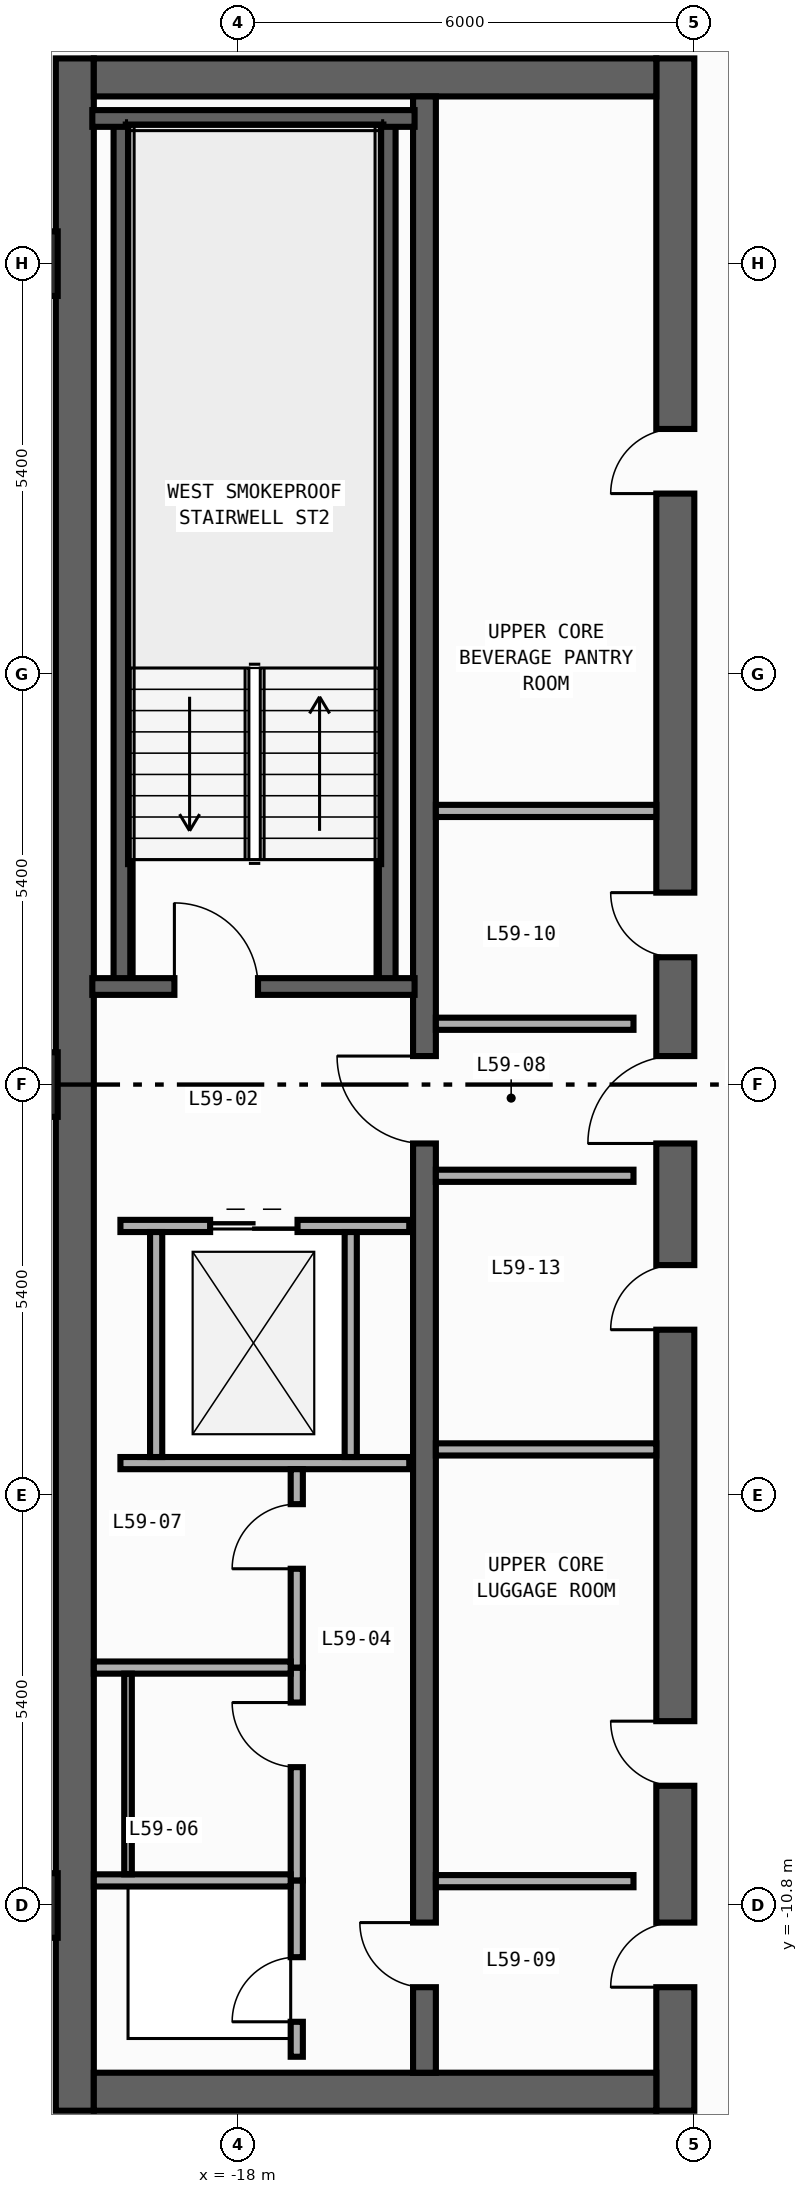
"""IFC4 building model, lengths in metres.
Left out: names, types, materials, properties, quantities, classifications, styles, units other than length and angle.
Written with IfcOpenShell. Run it as: python <this file> out.ifc"""

import sys

from ifc_helpers import new_model, si_unit, direction, frame, frame_2d, origin, origin_2d, place, context, subcontext, project, spatial, rectangle, extrude, element, fill, save


model = new_model("IFC4")
c1 = context("Model", 3, precision=1e-05, world=origin(), true_north=direction((0.0, 1.0)))
c2 = subcontext(c1, "Body", "Model", "MODEL_VIEW")
j1 = project(units=[si_unit("LENGTHUNIT", "METRE"), si_unit("PLANEANGLEUNIT", "RADIAN")], contexts=[c1])
p1 = place(None, origin())
s1 = spatial("IfcSite", under=j1, at=p1, CompositionType="ELEMENT")
p2 = place(p1, origin())
s2 = spatial("IfcBuilding", under=s1, at=p2, CompositionType="ELEMENT")
p3 = place(p2, frame((0.0, 0.0, 251.2)))
s3 = spatial("IfcBuildingStorey", under=s2, at=p3, CompositionType="ELEMENT", Elevation=251.2)
p4 = place(p3, frame((-20.15, -13.5, 0.0), z_axis=(0.0, 0.0, 1.0), x_axis=(0.0, 1.0, 0.0)))
e1 = element("IfcWall", 1, at=p4, inside=s3, PredefinedType="SHEAR", context=c2, shape_type="SweptSolid", body=[
    extrude(rectangle(XDim=27.0, YDim=0.5, at=frame_2d((13.5, 0.0))), origin(), (0.0, 0.0, 1.0), 3.34),
])
p5 = place(p3, frame((-12.25, -13.5, 0.0), z_axis=(0.0, 0.0, 1.0), x_axis=(0.0, 1.0, 0.0)))
e2 = element("IfcWall", 2, at=p5, inside=s3, PredefinedType="SHEAR", context=c2, shape_type="SweptSolid", body=[
    extrude(rectangle(XDim=27.0, YDim=0.5, at=frame_2d((13.5, 0.0))), origin(), (0.0, 0.0, 1.0), 3.34),
])
p6 = place(p5, frame((15.175, 0.0, 0.0)))
e3 = element("IfcOpeningElement", 3, at=p6, cuts=e2, PredefinedType="OPENING", context=c2, shape_type="SweptSolid", body=[
    extrude(rectangle(XDim=0.85, YDim=2.1, at=frame_2d((0.425, 1.05))), frame((0.0, 0.26, 0.0), z_axis=(0.0, -1.0, 0.0), x_axis=(1.0, 0.0, 0.0)), (0.0, 0.0, 1.0), 0.52),
])
p7 = place(p5, frame((21.275, 0.0, 0.0)))
e4 = element("IfcOpeningElement", 4, at=p7, cuts=e2, PredefinedType="OPENING", context=c2, shape_type="SweptSolid", body=[
    extrude(rectangle(XDim=0.85, YDim=2.1, at=frame_2d((0.425, 1.05))), frame((0.0, 0.26, 0.0), z_axis=(0.0, -1.0, 0.0), x_axis=(1.0, 0.0, 0.0)), (0.0, 0.0, 1.0), 0.52),
])
p8 = place(p5, frame((4.275, 0.0, 0.0)))
e5 = element("IfcOpeningElement", 5, at=p8, cuts=e2, PredefinedType="OPENING", context=c2, shape_type="SweptSolid", body=[
    extrude(rectangle(XDim=0.85, YDim=2.1, at=frame_2d((0.425, 1.05))), frame((0.0, 0.26, 0.0), z_axis=(0.0, -1.0, 0.0), x_axis=(1.0, 0.0, 0.0)), (0.0, 0.0, 1.0), 0.52),
])
p9 = place(p5, frame((10.275, 0.0, 0.0)))
e6 = element("IfcOpeningElement", 6, at=p9, cuts=e2, PredefinedType="OPENING", context=c2, shape_type="SweptSolid", body=[
    extrude(rectangle(XDim=0.85, YDim=2.1, at=frame_2d((0.425, 1.05))), frame((0.0, 0.26, 0.0), z_axis=(0.0, -1.0, 0.0), x_axis=(1.0, 0.0, 0.0)), (0.0, 0.0, 1.0), 0.52),
])
p10 = place(p5, frame((12.725, 0.0, 0.0)))
e7 = element("IfcOpeningElement", 7, at=p10, cuts=e2, PredefinedType="OPENING", context=c2, shape_type="SweptSolid", body=[
    extrude(rectangle(XDim=1.15, YDim=2.2, at=frame_2d((0.575, 1.1))), frame((0.0, 0.26, 0.0), z_axis=(0.0, -1.0, 0.0), x_axis=(1.0, 0.0, 0.0)), (0.0, 0.0, 1.0), 0.52),
])
p11 = place(p5, frame((1.625, 0.0, 0.0)))
e8 = element("IfcOpeningElement", 8, at=p11, cuts=e2, PredefinedType="OPENING", context=c2, shape_type="SweptSolid", body=[
    extrude(rectangle(XDim=0.85, YDim=2.1, at=frame_2d((0.425, 1.05))), frame((0.0, 0.26, 0.0), z_axis=(0.0, -1.0, 0.0), x_axis=(1.0, 0.0, 0.0)), (0.0, 0.0, 1.0), 0.52),
])
for number, where, z_axis, x_axis in (
    (9, (-19.9, -13.25, 0.0), (0.0, 0.0, 1.0), (1.0, 0.0, 0.0)),
    (10, (-19.9, 13.25, 0.0), (0.0, 0.0, 1.0), (1.0, 0.0, 0.0)),
):
    element("IfcWall", number, at=place(p3, frame(where, z_axis=z_axis, x_axis=x_axis)), inside=s3, PredefinedType="SHEAR", context=c2, shape_type="SweptSolid", body=[
        extrude(rectangle(XDim=7.4, YDim=0.5, at=frame_2d((3.7, 0.0))), origin(), (0.0, 0.0, 1.0), 3.34),
    ])
p12 = place(p3, frame((-15.55, -13.0, 0.0), z_axis=(0.0, 0.0, 1.0), x_axis=(0.0, 1.0, 0.0)))
e11 = element("IfcWall", 11, at=p12, inside=s3, PredefinedType="SHEAR", context=c2, shape_type="SweptSolid", body=[
    extrude(rectangle(XDim=26.0, YDim=0.3, at=frame_2d((13.0, 0.0))), origin(), (0.0, 0.0, 1.0), 3.34),
])
p13 = place(p12, frame((12.225, 0.0, 0.0)))
e12 = element("IfcOpeningElement", 12, at=p13, cuts=e11, PredefinedType="OPENING", context=c2, shape_type="SweptSolid", body=[
    extrude(rectangle(XDim=1.15, YDim=2.2, at=frame_2d((0.575, 1.1))), frame((0.0, 0.16, 0.0), z_axis=(0.0, -1.0, 0.0), x_axis=(1.0, 0.0, 0.0)), (0.0, 0.0, 1.0), 0.32),
])
p14 = place(p12, frame((1.125, 0.0, 0.0)))
e13 = element("IfcOpeningElement", 13, at=p14, cuts=e11, PredefinedType="OPENING", context=c2, shape_type="SweptSolid", body=[
    extrude(rectangle(XDim=0.85, YDim=2.1, at=frame_2d((0.425, 1.05))), frame((0.0, 0.16, 0.0), z_axis=(0.0, -1.0, 0.0), x_axis=(1.0, 0.0, 0.0)), (0.0, 0.0, 1.0), 0.32),
])
for number, where, z_axis, x_axis in (
    (14, (-16.04, 1.29, 0.0), (0.0, 0.0, 1.0), (0.0, 1.0, 0.0)),
    (15, (-19.53, 1.29, 0.0), (0.0, 0.0, 1.0), (0.0, 1.0, 0.0)),
):
    element("IfcWall", number, at=place(p3, frame(where, z_axis=z_axis, x_axis=x_axis)), inside=s3, PredefinedType="SHEAR", context=c2, shape_type="SweptSolid", body=[
        extrude(rectangle(XDim=11.42, YDim=0.22, at=frame_2d((5.71, 0.0))), origin(), (0.0, 0.0, 1.0), 3.34),
    ])
p15 = place(p3, frame((-19.92, 12.71, 0.0), z_axis=(0.0, 0.0, 1.0), x_axis=(1.0, 0.0, 0.0)))
e16 = element("IfcWall", 16, at=p15, inside=s3, PredefinedType="SHEAR", context=c2, shape_type="SweptSolid", body=[
    extrude(rectangle(XDim=4.24, YDim=0.22, at=frame_2d((2.12, 0.0))), origin(), (0.0, 0.0, 1.0), 3.34),
])
p16 = place(p3, frame((-19.92, 1.29, 0.0), z_axis=(0.0, 0.0, 1.0), x_axis=(1.0, 0.0, 0.0)))
e17 = element("IfcWall", 17, at=p16, inside=s3, PredefinedType="SHEAR", context=c2, shape_type="SweptSolid", body=[
    extrude(rectangle(XDim=4.24, YDim=0.22, at=frame_2d((2.12, 0.0))), origin(), (0.0, 0.0, 1.0), 3.34),
])
p17 = place(p16, frame((1.08, 0.0, 0.0)))
e18 = element("IfcOpeningElement", 18, at=p17, cuts=e17, PredefinedType="OPENING", context=c2, shape_type="SweptSolid", body=[
    extrude(rectangle(XDim=1.1, YDim=2.2, at=frame_2d((0.55, 1.1))), frame((0.0, 0.12, 0.0), z_axis=(0.0, -1.0, 0.0), x_axis=(1.0, 0.0, 0.0)), (0.0, 0.0, 1.0), 0.24),
])
for number, where, z_axis, x_axis in (
    (19, (-20.8, -10.8, 0.0), (0.0, 0.0, 1.0), (1.0, 0.0, 0.0)),
    (20, (-20.8, 0.0, 0.0), (0.0, 0.0, 1.0), (1.0, 0.0, 0.0)),
    (21, (-20.8, 10.8, 0.0), (0.0, 0.0, 1.0), (1.0, 0.0, 0.0)),
):
    element("IfcColumn", number, at=place(p3, frame(where, z_axis=z_axis, x_axis=x_axis)), inside=s3, PredefinedType="COLUMN", context=c2, shape_type="SweptSolid", body=[
        extrude(rectangle(XDim=0.85, YDim=0.85, at=origin_2d()), origin(), (0.0, 0.0, 1.0), 3.6),
    ])
p18 = place(p3, frame((-19.55, -1.86, 0.0), z_axis=(0.0, 0.0, 1.0), x_axis=(1.0, 0.0, 0.0)))
e22 = element("IfcWall", 22, at=p18, inside=s3, PredefinedType="STANDARD", context=c2, shape_type="SweptSolid", body=[
    extrude(rectangle(XDim=3.8, YDim=0.16, at=frame_2d((1.9, 0.0))), origin(), (0.0, 0.0, 1.0), 3.34),
])
p19 = place(p18, frame((1.18, 0.0, 0.0)))
e23 = element("IfcOpeningElement", 23, at=p19, cuts=e22, PredefinedType="OPENING", context=c2, shape_type="SweptSolid", body=[
    extrude(rectangle(XDim=1.15, YDim=2.2, at=frame_2d((0.575, 1.1))), frame((0.0, 0.09, 0.0), z_axis=(0.0, -1.0, 0.0), x_axis=(1.0, 0.0, 0.0)), (0.0, 0.0, 1.0), 0.18),
])
p20 = place(p3, frame((-19.55, -4.98, 0.0), z_axis=(0.0, 0.0, 1.0), x_axis=(1.0, 0.0, 0.0)))
e24 = element("IfcWall", 24, at=p20, inside=s3, PredefinedType="STANDARD", context=c2, shape_type="SweptSolid", body=[
    extrude(rectangle(XDim=3.8, YDim=0.16, at=frame_2d((1.9, 0.0))), origin(), (0.0, 0.0, 1.0), 3.34),
])
for number, where, z_axis, x_axis in (
    (25, (-19.08, -4.9, 0.0), (0.0, 0.0, 1.0), (0.0, 1.0, 0.0)),
    (26, (-16.52, -4.9, 0.0), (0.0, 0.0, 1.0), (0.0, 1.0, 0.0)),
):
    element("IfcWall", number, at=place(p3, frame(where, z_axis=z_axis, x_axis=x_axis)), inside=s3, PredefinedType="STANDARD", context=c2, shape_type="SweptSolid", body=[
        extrude(rectangle(XDim=2.96, YDim=0.16, at=frame_2d((1.48, 0.0))), origin(), (0.0, 0.0, 1.0), 3.34),
    ])
for number, where, z_axis, x_axis in (
    (27, (-15.4, 0.8, 0.0), (0.0, 0.0, 1.0), (1.0, 0.0, 0.0)),
    (28, (-15.4, -1.2, 0.0), (0.0, 0.0, 1.0), (1.0, 0.0, 0.0)),
    (29, (-15.4, -10.48, 0.0), (0.0, 0.0, 1.0), (1.0, 0.0, 0.0)),
):
    element("IfcWall", number, at=place(p3, frame(where, z_axis=z_axis, x_axis=x_axis)), inside=s3, PredefinedType="STANDARD", context=c2, shape_type="SweptSolid", body=[
        extrude(rectangle(XDim=2.6, YDim=0.16, at=frame_2d((1.3, 0.0))), origin(), (0.0, 0.0, 1.0), 3.34),
    ])
p21 = place(p3, frame((-17.23, -12.79, 0.0), z_axis=(0.0, 0.0, 1.0), x_axis=(0.0, 1.0, 0.0)))
e30 = element("IfcWall", 30, at=p21, inside=s3, PredefinedType="PARTITIONING", context=c2, shape_type="SweptSolid", body=[
    extrude(rectangle(XDim=2.32, YDim=0.16, at=frame_2d((1.16, 0.0))), origin(), (0.0, 0.0, 1.0), 3.34),
])
p22 = place(p21, frame((0.46, 0.0, 0.0)))
e31 = element("IfcOpeningElement", 31, at=p22, cuts=e30, PredefinedType="OPENING", context=c2, shape_type="SweptSolid", body=[
    extrude(rectangle(XDim=0.85, YDim=2.1, at=frame_2d((0.425, 1.05))), frame((0.0, 0.09, 0.0), z_axis=(0.0, -1.0, 0.0), x_axis=(1.0, 0.0, 0.0)), (0.0, 0.0, 1.0), 0.18),
])
p23 = place(p3, frame((-17.23, -10.47, 0.0), z_axis=(0.0, 0.0, 1.0), x_axis=(0.0, 1.0, 0.0)))
e32 = element("IfcWall", 32, at=p23, inside=s3, PredefinedType="PARTITIONING", context=c2, shape_type="SweptSolid", body=[
    extrude(rectangle(XDim=2.8, YDim=0.16, at=frame_2d((1.4, 0.0))), origin(), (0.0, 0.0, 1.0), 3.34),
])
p24 = place(p23, frame((1.49, 0.0, 0.0)))
e33 = element("IfcOpeningElement", 33, at=p24, cuts=e32, PredefinedType="OPENING", context=c2, shape_type="SweptSolid", body=[
    extrude(rectangle(XDim=0.85, YDim=2.1, at=frame_2d((0.425, 1.05))), frame((0.0, 0.09, 0.0), z_axis=(0.0, -1.0, 0.0), x_axis=(1.0, 0.0, 0.0)), (0.0, 0.0, 1.0), 0.18),
])
p25 = place(p3, frame((-17.23, -7.67, 0.0), z_axis=(0.0, 0.0, 1.0), x_axis=(0.0, 1.0, 0.0)))
e34 = element("IfcWall", 34, at=p25, inside=s3, PredefinedType="PARTITIONING", context=c2, shape_type="SweptSolid", body=[
    extrude(rectangle(XDim=2.61, YDim=0.16, at=frame_2d((1.305, 0.0))), origin(), (0.0, 0.0, 1.0), 3.34),
])
p26 = place(p25, frame((1.3, 0.0, 0.0)))
e35 = element("IfcOpeningElement", 35, at=p26, cuts=e34, PredefinedType="OPENING", context=c2, shape_type="SweptSolid", body=[
    extrude(rectangle(XDim=0.85, YDim=2.1, at=frame_2d((0.425, 1.05))), frame((0.0, 0.09, 0.0), z_axis=(0.0, -1.0, 0.0), x_axis=(1.0, 0.0, 0.0)), (0.0, 0.0, 1.0), 0.18),
])
for number, where, z_axis, x_axis in (
    (36, (-19.9, -10.47, 0.0), (0.0, 0.0, 1.0), (1.0, 0.0, 0.0)),
    (37, (-19.9, -7.67, 0.0), (0.0, 0.0, 1.0), (1.0, 0.0, 0.0)),
):
    element("IfcWall", number, at=place(p3, frame(where, z_axis=z_axis, x_axis=x_axis)), inside=s3, PredefinedType="PARTITIONING", context=c2, shape_type="SweptSolid", body=[
        extrude(rectangle(XDim=2.59, YDim=0.16, at=frame_2d((1.295, 0.0))), origin(), (0.0, 0.0, 1.0), 3.34),
    ])
for number, where, z_axis, x_axis in (
    (38, (-15.4, 3.6, 0.0), (0.0, 0.0, 1.0), (1.0, 0.0, 0.0)),
    (39, (-15.4, -4.8, 0.0), (0.0, 0.0, 1.0), (1.0, 0.0, 0.0)),
):
    element("IfcWall", number, at=place(p3, frame(where, z_axis=z_axis, x_axis=x_axis)), inside=s3, PredefinedType="PARTITIONING", context=c2, shape_type="SweptSolid", body=[
        extrude(rectangle(XDim=2.9, YDim=0.16, at=frame_2d((1.45, 0.0))), origin(), (0.0, 0.0, 1.0), 3.34),
    ])
p27 = place(p3, frame((-19.45, -10.39, 0.0), z_axis=(0.0, 0.0, 1.0), x_axis=(0.0, 1.0, 0.0)))
e40 = element("IfcWall", 40, at=p27, inside=s3, PredefinedType="PARTITIONING", context=c2, shape_type="SweptSolid", body=[
    extrude(rectangle(XDim=2.64, YDim=0.1, at=frame_2d((1.32, 0.0))), origin(), (0.0, 0.0, 1.0), 3.34),
])
p28 = place(p17, origin())
e41 = element("IfcDoor", 41, at=p28, inside=s3, OperationType="SINGLE_SWING_LEFT", PredefinedType="DOOR", context=c2, shape_type="SweptSolid", body=[
    extrude(rectangle(XDim=1.1, YDim=2.2, at=frame_2d((0.55, 1.1))), frame((0.0, 0.025, 0.0), z_axis=(0.0, -1.0, 0.0), x_axis=(1.0, 0.0, 0.0)), (0.0, 0.0, 1.0), 0.05),
])
fill(e18, e41)
p29 = place(p6, origin())
e42 = element("IfcDoor", 42, at=p29, inside=s3, OperationType="SINGLE_SWING_RIGHT", PredefinedType="DOOR", context=c2, shape_type="SweptSolid", body=[
    extrude(rectangle(XDim=0.85, YDim=2.1, at=frame_2d((0.425, 1.05))), frame((0.0, 0.025, 0.0), z_axis=(0.0, -1.0, 0.0), x_axis=(1.0, 0.0, 0.0)), (0.0, 0.0, 1.0), 0.05),
])
fill(e3, e42)
p30 = place(p7, origin())
e43 = element("IfcDoor", 43, at=p30, inside=s3, OperationType="SINGLE_SWING_LEFT", PredefinedType="DOOR", context=c2, shape_type="SweptSolid", body=[
    extrude(rectangle(XDim=0.85, YDim=2.1, at=frame_2d((0.425, 1.05))), frame((0.0, 0.025, 0.0), z_axis=(0.0, -1.0, 0.0), x_axis=(1.0, 0.0, 0.0)), (0.0, 0.0, 1.0), 0.05),
])
fill(e4, e43)
p31 = place(p8, origin())
e44 = element("IfcDoor", 44, at=p31, inside=s3, OperationType="SINGLE_SWING_RIGHT", PredefinedType="DOOR", context=c2, shape_type="SweptSolid", body=[
    extrude(rectangle(XDim=0.85, YDim=2.1, at=frame_2d((0.425, 1.05))), frame((0.0, 0.025, 0.0), z_axis=(0.0, -1.0, 0.0), x_axis=(1.0, 0.0, 0.0)), (0.0, 0.0, 1.0), 0.05),
])
fill(e5, e44)
p32 = place(p9, origin())
e45 = element("IfcDoor", 45, at=p32, inside=s3, OperationType="SINGLE_SWING_LEFT", PredefinedType="DOOR", context=c2, shape_type="SweptSolid", body=[
    extrude(rectangle(XDim=0.85, YDim=2.1, at=frame_2d((0.425, 1.05))), frame((0.0, 0.025, 0.0), z_axis=(0.0, -1.0, 0.0), x_axis=(1.0, 0.0, 0.0)), (0.0, 0.0, 1.0), 0.05),
])
fill(e6, e45)
p33 = place(p10, origin())
e46 = element("IfcDoor", 46, at=p33, inside=s3, OperationType="SINGLE_SWING_LEFT", PredefinedType="DOOR", context=c2, shape_type="SweptSolid", body=[
    extrude(rectangle(XDim=1.15, YDim=2.2, at=frame_2d((0.575, 1.1))), frame((0.0, 0.025, 0.0), z_axis=(0.0, -1.0, 0.0), x_axis=(1.0, 0.0, 0.0)), (0.0, 0.0, 1.0), 0.05),
])
fill(e7, e46)
p34 = place(p13, origin())
e47 = element("IfcDoor", 47, at=p34, inside=s3, OperationType="SINGLE_SWING_RIGHT", PredefinedType="DOOR", context=c2, shape_type="SweptSolid", body=[
    extrude(rectangle(XDim=1.15, YDim=2.2, at=frame_2d((0.575, 1.1))), frame((0.0, 0.025, 0.0), z_axis=(0.0, -1.0, 0.0), x_axis=(1.0, 0.0, 0.0)), (0.0, 0.0, 1.0), 0.05),
])
fill(e12, e47)
p35 = place(p11, origin())
e48 = element("IfcDoor", 48, at=p35, inside=s3, OperationType="SINGLE_SWING_LEFT", PredefinedType="DOOR", context=c2, shape_type="SweptSolid", body=[
    extrude(rectangle(XDim=0.85, YDim=2.1, at=frame_2d((0.425, 1.05))), frame((0.0, 0.025, 0.0), z_axis=(0.0, -1.0, 0.0), x_axis=(1.0, 0.0, 0.0)), (0.0, 0.0, 1.0), 0.05),
])
fill(e8, e48)
p36 = place(p14, origin())
e49 = element("IfcDoor", 49, at=p36, inside=s3, OperationType="SINGLE_SWING_RIGHT", PredefinedType="DOOR", context=c2, shape_type="SweptSolid", body=[
    extrude(rectangle(XDim=0.85, YDim=2.1, at=frame_2d((0.425, 1.05))), frame((0.0, 0.025, 0.0), z_axis=(0.0, -1.0, 0.0), x_axis=(1.0, 0.0, 0.0)), (0.0, 0.0, 1.0), 0.05),
])
fill(e13, e49)
p37 = place(p19, origin())
e50 = element("IfcDoor", 50, at=p37, inside=s3, OperationType="DOUBLE_DOOR_SLIDING", PredefinedType="DOOR", context=c2, shape_type="SweptSolid", body=[
    extrude(rectangle(XDim=1.15, YDim=2.2, at=frame_2d((0.575, 1.1))), frame((0.0, 0.025, 0.0), z_axis=(0.0, -1.0, 0.0), x_axis=(1.0, 0.0, 0.0)), (0.0, 0.0, 1.0), 0.05),
])
fill(e23, e50)
p38 = place(p22, origin())
e51 = element("IfcDoor", 51, at=p38, inside=s3, OperationType="SINGLE_SWING_LEFT", PredefinedType="DOOR", context=c2, shape_type="SweptSolid", body=[
    extrude(rectangle(XDim=0.85, YDim=2.1, at=frame_2d((0.425, 1.05))), frame((0.0, 0.025, 0.0), z_axis=(0.0, -1.0, 0.0), x_axis=(1.0, 0.0, 0.0)), (0.0, 0.0, 1.0), 0.05),
])
fill(e31, e51)
p39 = place(p24, origin())
e52 = element("IfcDoor", 52, at=p39, inside=s3, OperationType="SINGLE_SWING_RIGHT", PredefinedType="DOOR", context=c2, shape_type="SweptSolid", body=[
    extrude(rectangle(XDim=0.85, YDim=2.1, at=frame_2d((0.425, 1.05))), frame((0.0, 0.025, 0.0), z_axis=(0.0, -1.0, 0.0), x_axis=(1.0, 0.0, 0.0)), (0.0, 0.0, 1.0), 0.05),
])
fill(e33, e52)
p40 = place(p26, origin())
e53 = element("IfcDoor", 53, at=p40, inside=s3, OperationType="SINGLE_SWING_LEFT", PredefinedType="DOOR", context=c2, shape_type="SweptSolid", body=[
    extrude(rectangle(XDim=0.85, YDim=2.1, at=frame_2d((0.425, 1.05))), frame((0.0, 0.025, 0.0), z_axis=(0.0, -1.0, 0.0), x_axis=(1.0, 0.0, 0.0)), (0.0, 0.0, 1.0), 0.05),
])
fill(e35, e53)
save(model, sys.argv[1])
